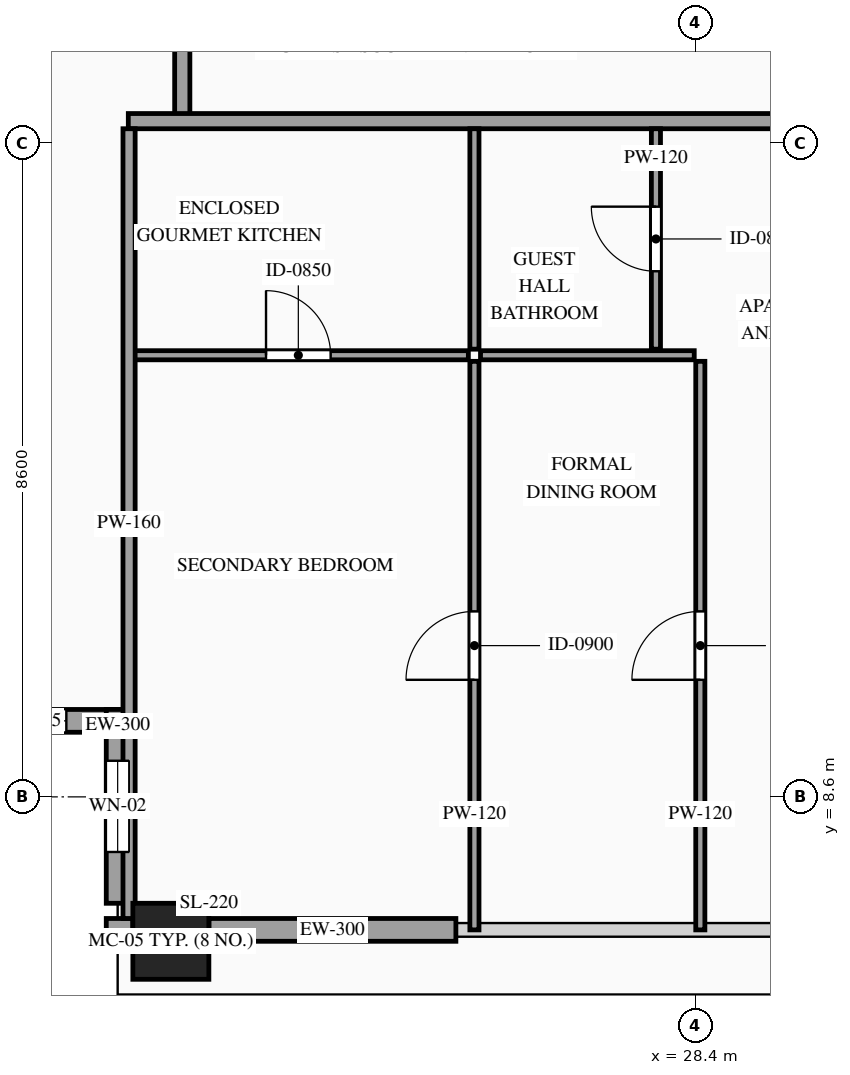
"""IFC4 building model, lengths in metres.
Left out: names, types, materials, properties, quantities, classifications, styles, units other than length and angle.
Written with IfcOpenShell. Run it as: python <this file> out.ifc"""

import sys

from ifc_helpers import new_model, si_unit, direction, frame, frame_2d, origin, origin_2d, place, context, subcontext, project, spatial, rectangle, hollow_rectangle, extrude, source, transform, mapped, element, fill, save


model = new_model("IFC4")
c1 = context("Model", 3, precision=1e-05, world=origin(), true_north=direction((0.0, 1.0)))
c2 = subcontext(c1, "Body", "Model", "MODEL_VIEW")
j1 = project(units=[si_unit("LENGTHUNIT", "METRE"), si_unit("PLANEANGLEUNIT", "RADIAN")], contexts=[c1])
p1 = place(None, origin())
s1 = spatial("IfcSite", under=j1, at=p1, CompositionType="ELEMENT")
p2 = place(p1, origin())
s2 = spatial("IfcBuilding", under=s1, at=p2, CompositionType="ELEMENT")
p3 = place(p2, frame((0.0, 0.0, 328.7)))
s3 = spatial("IfcBuildingStorey", under=s2, at=p3, CompositionType="ELEMENT", Elevation=328.7)
m1 = source(origin(), c2, "Body", "SweptSolid", [
    extrude(hollow_rectangle(XDim=1.0, YDim=1.0, WallThickness=0.048, at=origin_2d()), origin(), (0.0, 0.0, 1.0), 3.5),
])
p4 = place(p3, frame((21.5, 6.7, 0.0), z_axis=(0.0, 0.0, 1.0), x_axis=(1.0, 0.0, 0.0)))
e1 = element("IfcColumn", 1, at=p4, inside=s3, PredefinedType="COLUMN", context=c2, shape_type="MappedRepresentation", body=[
    mapped(m1, transform((0.0, 0.0, 0.0), scale=1.0)),
])
p5 = place(p3, frame((18.4, 9.6, 0.0), z_axis=(0.0, 0.0, 1.0), x_axis=(1.0, 0.0, 0.0)))
e2 = element("IfcWall", 2, at=p5, inside=s3, PredefinedType="SOLIDWALL", context=c2, shape_type="SweptSolid", body=[
    extrude(rectangle(XDim=2.55, YDim=0.3, at=frame_2d((1.275, 0.0))), origin(), (0.0, 0.0, 1.0), 3.28),
])
p6 = place(p5, frame((0.825, 0.0, 0.85)))
e3 = element("IfcOpeningElement", 3, at=p6, cuts=e2, PredefinedType="OPENING", context=c2, shape_type="SweptSolid", body=[
    extrude(rectangle(XDim=0.9, YDim=1.5, at=frame_2d((0.45, 0.75))), frame((0.0, 0.165, 0.0), z_axis=(0.0, -1.0, 0.0), x_axis=(1.0, 0.0, 0.0)), (0.0, 0.0, 1.0), 0.33),
])
p7 = place(p3, frame((20.8, 9.75, 0.0), z_axis=(0.0, 0.0, 1.0), x_axis=(0.0, -1.0, 0.0)))
e4 = element("IfcWall", 4, at=p7, inside=s3, PredefinedType="SOLIDWALL", context=c2, shape_type="SweptSolid", body=[
    extrude(rectangle(XDim=2.55, YDim=0.3, at=frame_2d((1.275, 0.0))), origin(), (0.0, 0.0, 1.0), 3.28),
])
p8 = place(p7, frame((0.675, 0.0, 0.85)))
e5 = element("IfcOpeningElement", 5, at=p8, cuts=e4, PredefinedType="OPENING", context=c2, shape_type="SweptSolid", body=[
    extrude(rectangle(XDim=1.2, YDim=2.1, at=frame_2d((0.6, 1.05))), frame((0.0, 0.165, 0.0), z_axis=(0.0, -1.0, 0.0), x_axis=(1.0, 0.0, 0.0)), (0.0, 0.0, 1.0), 0.33),
])
m2 = source(origin(), c2, "Body", "SweptSolid", [
    extrude(rectangle(XDim=0.35, YDim=0.3, at=frame_2d((0.175, 0.0))), origin(), (0.0, 0.0, 1.0), 3.28),
])
p9 = place(p3, frame((20.65, 6.85, 0.0), z_axis=(0.0, 0.0, 1.0), x_axis=(1.0, 0.0, 0.0)))
e6 = element("IfcWall", 6, at=p9, inside=s3, PredefinedType="SOLIDWALL", context=c2, shape_type="MappedRepresentation", body=[
    mapped(m2, transform((0.0, 0.0, 0.0), scale=1.0)),
])
m3 = source(origin(), c2, "Body", "SweptSolid", [
    extrude(rectangle(XDim=3.25, YDim=0.3, at=frame_2d((1.625, 0.0))), origin(), (0.0, 0.0, 1.0), 2.885),
])
p10 = place(p3, frame((22.0, 6.85, 0.0), z_axis=(0.0, 0.0, 1.0), x_axis=(1.0, 0.0, 0.0)))
e7 = element("IfcWall", 7, at=p10, inside=s3, PredefinedType="SOLIDWALL", context=c2, shape_type="MappedRepresentation", body=[
    mapped(m3, transform((0.0, 0.0, 0.0), scale=1.0)),
])
m4 = source(origin(), c2, "Body", "SweptSolid", [
    extrude(rectangle(XDim=1.7, YDim=0.2, at=frame_2d((0.85, 0.0))), origin(), (0.0, 0.0, 1.0), 3.28),
])
p11 = place(p3, frame((21.65, 17.55, 0.0), z_axis=(0.0, 0.0, 1.0), x_axis=(0.0, 1.0, 0.0)))
e8 = element("IfcWall", 8, at=p11, inside=s3, PredefinedType="PARTITIONING", context=c2, shape_type="MappedRepresentation", body=[
    mapped(m4, transform((0.0, 0.0, 0.0), scale=1.0)),
])
p12 = place(p3, frame((20.94, 17.49, 0.0), z_axis=(0.0, 0.0, 1.0), x_axis=(1.0, 0.0, 0.0)))
e9 = element("IfcWall", 9, at=p12, inside=s3, PredefinedType="PARTITIONING", context=c2, shape_type="SweptSolid", body=[
    extrude(rectangle(XDim=15.98, YDim=0.2, at=frame_2d((7.99, 0.0))), origin(), (0.0, 0.0, 1.0), 3.28),
])
p13 = place(p12, frame((8.816, 0.0, 0.0)))
e10 = element("IfcOpeningElement", 10, at=p13, cuts=e9, PredefinedType="OPENING", context=c2, shape_type="SweptSolid", body=[
    extrude(rectangle(XDim=1.0, YDim=2.2, at=frame_2d((0.5, 1.1))), frame((0.0, 0.115, 0.0), z_axis=(0.0, -1.0, 0.0), x_axis=(1.0, 0.0, 0.0)), (0.0, 0.0, 1.0), 0.23),
])
p14 = place(p3, frame((20.94, 14.41, 0.0), z_axis=(0.0, 0.0, 1.0), x_axis=(1.0, 0.0, 0.0)))
e11 = element("IfcWall", 11, at=p14, inside=s3, PredefinedType="PARTITIONING", context=c2, shape_type="SweptSolid", body=[
    extrude(rectangle(XDim=4.474, YDim=0.12, at=frame_2d((2.237, 0.0))), origin(), (0.0, 0.0, 1.0), 3.28),
])
p15 = place(p14, frame((1.812, 0.0, 0.0)))
e12 = element("IfcOpeningElement", 12, at=p15, cuts=e11, PredefinedType="OPENING", context=c2, shape_type="SweptSolid", body=[
    extrude(rectangle(XDim=0.85, YDim=2.1, at=frame_2d((0.425, 1.05))), frame((0.0, 0.075, 0.0), z_axis=(0.0, -1.0, 0.0), x_axis=(1.0, 0.0, 0.0)), (0.0, 0.0, 1.0), 0.15),
])
m5 = source(origin(), c2, "Body", "SweptSolid", [
    extrude(rectangle(XDim=2.9, YDim=0.12, at=frame_2d((1.45, 0.0))), origin(), (0.0, 0.0, 1.0), 3.28),
])
p16 = place(p3, frame((25.494, 14.49, 0.0), z_axis=(0.0, 0.0, 1.0), x_axis=(0.0, 1.0, 0.0)))
e13 = element("IfcWall", 13, at=p16, inside=s3, PredefinedType="PARTITIONING", context=c2, shape_type="MappedRepresentation", body=[
    mapped(m5, transform((0.0, 0.0, 0.0), scale=1.0)),
])
p17 = place(p3, frame((27.882, 14.49, 0.0), z_axis=(0.0, 0.0, 1.0), x_axis=(0.0, 1.0, 0.0)))
e14 = element("IfcWall", 14, at=p17, inside=s3, PredefinedType="PARTITIONING", context=c2, shape_type="SweptSolid", body=[
    extrude(rectangle(XDim=2.9, YDim=0.12, at=frame_2d((1.45, 0.0))), origin(), (0.0, 0.0, 1.0), 3.28),
])
p18 = place(p17, frame((1.025, 0.0, 0.0)))
e15 = element("IfcOpeningElement", 15, at=p18, cuts=e14, PredefinedType="OPENING", context=c2, shape_type="SweptSolid", body=[
    extrude(rectangle(XDim=0.85, YDim=2.1, at=frame_2d((0.425, 1.05))), frame((0.0, 0.075, 0.0), z_axis=(0.0, -1.0, 0.0), x_axis=(1.0, 0.0, 0.0)), (0.0, 0.0, 1.0), 0.15),
])
p19 = place(p3, frame((25.494, 6.85, 0.0), z_axis=(0.0, 0.0, 1.0), x_axis=(0.0, 1.0, 0.0)))
e16 = element("IfcWall", 16, at=p19, inside=s3, PredefinedType="PARTITIONING", context=c2, shape_type="SweptSolid", body=[
    extrude(rectangle(XDim=7.48, YDim=0.12, at=frame_2d((3.74, 0.0))), origin(), (0.0, 0.0, 1.0), 3.28),
])
p20 = place(p19, frame((3.29, 0.0, 0.0)))
e17 = element("IfcOpeningElement", 17, at=p20, cuts=e16, PredefinedType="OPENING", context=c2, shape_type="SweptSolid", body=[
    extrude(rectangle(XDim=0.9, YDim=2.15, at=frame_2d((0.45, 1.075))), frame((0.0, 0.075, 0.0), z_axis=(0.0, -1.0, 0.0), x_axis=(1.0, 0.0, 0.0)), (0.0, 0.0, 1.0), 0.15),
])
m6 = source(origin(), c2, "Body", "SweptSolid", [
    extrude(rectangle(XDim=2.812, YDim=0.12, at=frame_2d((1.406, 0.0))), origin(), (0.0, 0.0, 1.0), 3.28),
])
p21 = place(p3, frame((25.574, 14.41, 0.0), z_axis=(0.0, 0.0, 1.0), x_axis=(1.0, 0.0, 0.0)))
e18 = element("IfcWall", 18, at=p21, inside=s3, PredefinedType="PARTITIONING", context=c2, shape_type="MappedRepresentation", body=[
    mapped(m6, transform((0.0, 0.0, 0.0), scale=1.0)),
])
p22 = place(p3, frame((28.466, 6.85, 0.0), z_axis=(0.0, 0.0, 1.0), x_axis=(0.0, 1.0, 0.0)))
e19 = element("IfcWall", 19, at=p22, inside=s3, PredefinedType="PARTITIONING", context=c2, shape_type="SweptSolid", body=[
    extrude(rectangle(XDim=7.48, YDim=0.12, at=frame_2d((3.74, 0.0))), origin(), (0.0, 0.0, 1.0), 3.28),
])
p23 = place(p22, frame((3.29, 0.0, 0.0)))
e20 = element("IfcOpeningElement", 20, at=p23, cuts=e19, PredefinedType="OPENING", context=c2, shape_type="SweptSolid", body=[
    extrude(rectangle(XDim=0.9, YDim=2.15, at=frame_2d((0.45, 1.075))), frame((0.0, 0.075, 0.0), z_axis=(0.0, -1.0, 0.0), x_axis=(1.0, 0.0, 0.0)), (0.0, 0.0, 1.0), 0.15),
])
m7 = source(origin(), c2, "Body", "SweptSolid", [
    extrude(rectangle(XDim=10.39, YDim=0.16, at=frame_2d((5.195, 0.0))), origin(), (0.0, 0.0, 1.0), 3.28),
])
p24 = place(p3, frame((20.95, 7.0, 0.0), z_axis=(0.0, 0.0, 1.0), x_axis=(0.0, 1.0, 0.0)))
e21 = element("IfcWall", 21, at=p24, inside=s3, PredefinedType="PARTITIONING", context=c2, shape_type="MappedRepresentation", body=[
    mapped(m7, transform((0.0, 0.0, 0.0), scale=1.0)),
])
m8 = source(origin(), c2, "Body", "SweptSolid", [
    extrude(rectangle(XDim=0.9, YDim=1.5, at=frame_2d((0.45, 0.75))), frame((0.0, 0.03, 0.0), z_axis=(0.0, -1.0, 0.0), x_axis=(1.0, 0.0, 0.0)), (0.0, 0.0, 1.0), 0.06),
])
p25 = place(p6, origin())
e22 = element("IfcWindow", 22, at=p25, inside=s3, PartitioningType="SINGLE_PANEL", PredefinedType="WINDOW", context=c2, shape_type="MappedRepresentation", body=[
    mapped(m8, transform((0.0, 0.0, 0.0), scale=1.0)),
])
fill(e3, e22)
m9 = source(origin(), c2, "Body", "SweptSolid", [
    extrude(rectangle(XDim=1.2, YDim=2.1, at=frame_2d((0.6, 1.05))), frame((0.0, 0.03, 0.0), z_axis=(0.0, -1.0, 0.0), x_axis=(1.0, 0.0, 0.0)), (0.0, 0.0, 1.0), 0.06),
])
p26 = place(p8, origin())
e23 = element("IfcWindow", 23, at=p26, inside=s3, PartitioningType="SINGLE_PANEL", PredefinedType="WINDOW", context=c2, shape_type="MappedRepresentation", body=[
    mapped(m9, transform((0.0, 0.0, 0.0), scale=1.0)),
])
fill(e5, e23)
m10 = source(origin(), c2, "Body", "SweptSolid", [
    extrude(rectangle(XDim=0.85, YDim=2.1, at=frame_2d((0.425, 1.05))), frame((0.0, 0.025, 0.0), z_axis=(0.0, -1.0, 0.0), x_axis=(1.0, 0.0, 0.0)), (0.0, 0.0, 1.0), 0.05),
])
p27 = place(p15, origin())
e24 = element("IfcDoor", 24, at=p27, inside=s3, OperationType="SINGLE_SWING_LEFT", PredefinedType="DOOR", context=c2, shape_type="MappedRepresentation", body=[
    mapped(m10, transform((0.0, 0.0, 0.0), scale=1.0)),
])
fill(e12, e24)
p28 = place(p18, origin())
e25 = element("IfcDoor", 25, at=p28, inside=s3, OperationType="SINGLE_SWING_RIGHT", PredefinedType="DOOR", context=c2, shape_type="MappedRepresentation", body=[
    mapped(m10, transform((0.0, 0.0, 0.0), scale=1.0)),
])
fill(e15, e25)
m11 = source(origin(), c2, "Body", "SweptSolid", [
    extrude(rectangle(XDim=0.9, YDim=2.15, at=frame_2d((0.45, 1.075))), frame((0.0, 0.025, 0.0), z_axis=(0.0, -1.0, 0.0), x_axis=(1.0, 0.0, 0.0)), (0.0, 0.0, 1.0), 0.05),
])
p29 = place(p20, origin())
e26 = element("IfcDoor", 26, at=p29, inside=s3, OperationType="SINGLE_SWING_LEFT", PredefinedType="DOOR", context=c2, shape_type="MappedRepresentation", body=[
    mapped(m11, transform((0.0, 0.0, 0.0), scale=1.0)),
])
fill(e17, e26)
p30 = place(p23, origin())
e27 = element("IfcDoor", 27, at=p30, inside=s3, OperationType="SINGLE_SWING_LEFT", PredefinedType="DOOR", context=c2, shape_type="MappedRepresentation", body=[
    mapped(m11, transform((0.0, 0.0, 0.0), scale=1.0)),
])
fill(e20, e27)
save(model, sys.argv[1])
